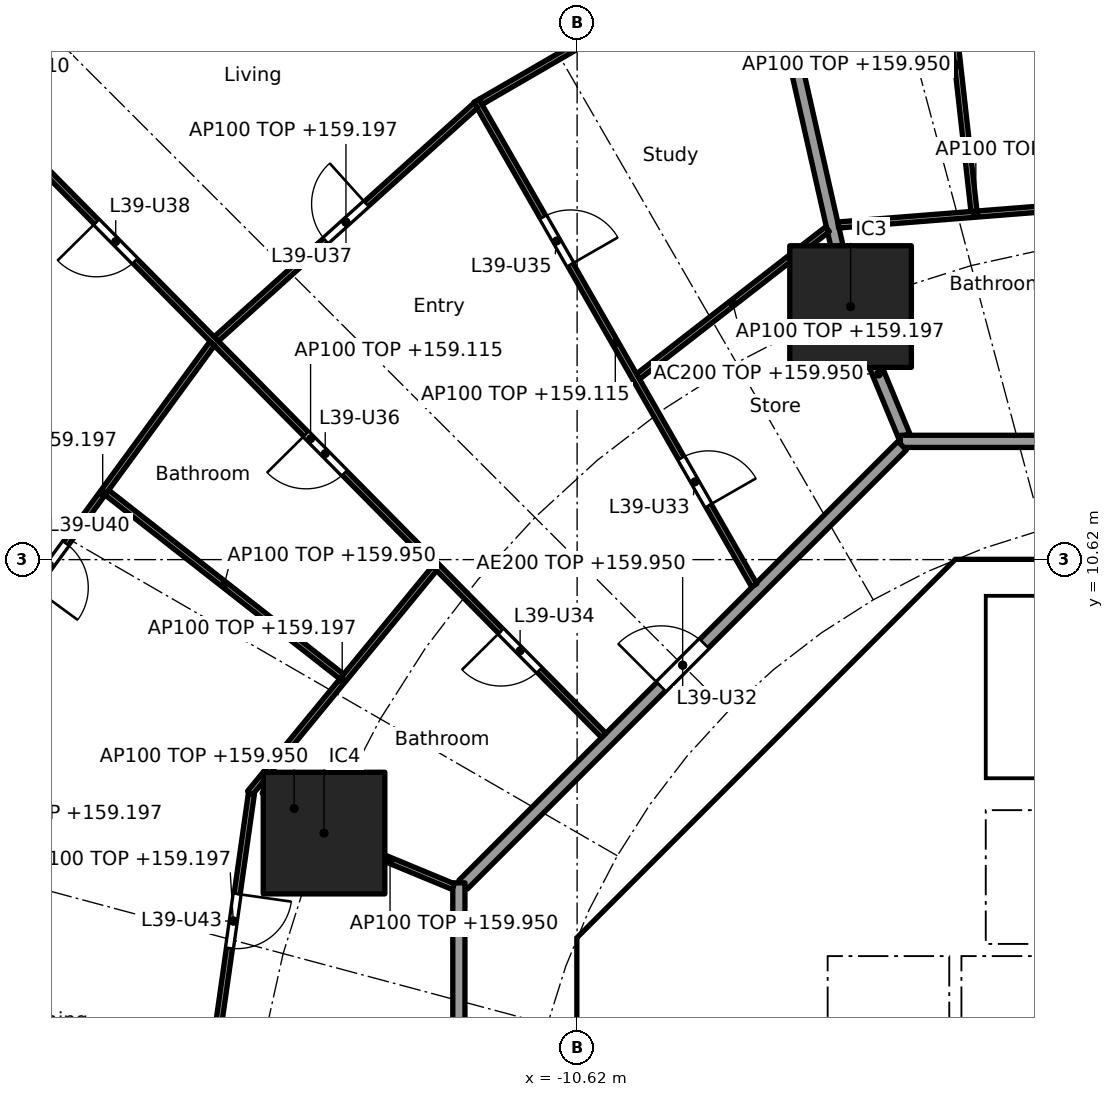
"""IFC4 building model, lengths in metres.
Left out: names, types, materials, properties, quantities, classifications, styles, units other than length and angle.
Written with IfcOpenShell. Run it as: python <this file> out.ifc"""

import sys

from ifc_helpers import new_model, si_unit, direction, frame, frame_2d, origin, origin_2d, place, context, subcontext, project, spatial, polyline, rectangle, outline, extrude, element, fill, save


model = new_model("IFC4")
c1 = context("Model", 3, precision=1e-05, world=origin(), true_north=direction((0.0, 1.0)))
c2 = subcontext(c1, "Body", "Model", "MODEL_VIEW")
j1 = project(units=[si_unit("LENGTHUNIT", "METRE"), si_unit("PLANEANGLEUNIT", "RADIAN")], contexts=[c1])
p1 = place(None, origin())
s1 = spatial("IfcSite", under=j1, at=p1, CompositionType="ELEMENT")
p2 = place(p1, origin())
s2 = spatial("IfcBuilding", under=s1, at=p2, CompositionType="ELEMENT")
p3 = place(p2, frame((0.0, 0.0, 156.6)))
s3 = spatial("IfcBuildingStorey", under=s2, at=p3, CompositionType="ELEMENT", Elevation=156.6)
for number, where, z_axis, x_axis in (
    (1, (-6.123, 14.782, 0.0), (0.0, 0.0, 1.0), (1.0, 0.0, 0.0)),
    (2, (-14.782, 6.123, 0.0), (0.0, 0.0, 1.0), (1.0, 0.0, 0.0)),
):
    element("IfcColumn", number, at=place(p3, frame(where, z_axis=z_axis, x_axis=x_axis)), inside=s3, PredefinedType="COLUMN", context=c2, shape_type="SweptSolid", body=[
        extrude(rectangle(XDim=2.0, YDim=2.0, at=origin_2d()), origin(), (0.0, 0.0, 1.0), 3.7),
    ])
p4 = place(p3, frame((-4.613, 9.988, 0.0), z_axis=(0.0, 0.0, 1.0), x_axis=(-0.707106781187, -0.707106781187, 0.0)))
e3 = element("IfcWall", 3, at=p4, inside=s3, PredefinedType="SHEAR", context=c2, shape_type="SweptSolid", body=[
    extrude(rectangle(XDim=7.602, YDim=0.6, at=frame_2d((3.801, 0.0))), origin(), (0.0, 0.0, 1.0), 3.35),
])
p5 = place(p4, frame((0.351, 0.0, 0.0)))
e4 = element("IfcOpeningElement", 4, at=p5, cuts=e3, PredefinedType="OPENING", context=c2, shape_type="SweptSolid", body=[
    extrude(rectangle(XDim=1.1, YDim=2.1, at=frame_2d((0.55, 1.05))), frame((0.0, 0.31, 0.0), z_axis=(0.0, -1.0, 0.0), x_axis=(1.0, 0.0, 0.0)), (0.0, 0.0, 1.0), 0.62),
])
p6 = place(p3, frame((-10.325, 3.801, 0.0), z_axis=(0.0, 0.0, 1.0), x_axis=(0.0, -1.0, 0.0)))
e5 = element("IfcWall", 5, at=p6, inside=s3, PredefinedType="SHEAR", context=c2, shape_type="SweptSolid", body=[
    extrude(rectangle(XDim=7.602, YDim=0.6, at=frame_2d((3.801, 0.0))), origin(), (0.0, 0.0, 1.0), 3.35),
])
p7 = place(p6, frame((0.651, 0.0, 0.0)))
e6 = element("IfcOpeningElement", 6, at=p7, cuts=e5, PredefinedType="OPENING", context=c2, shape_type="SweptSolid", body=[
    extrude(rectangle(XDim=1.5, YDim=2.1, at=frame_2d((0.75, 1.05))), frame((0.0, 0.31, 0.0), z_axis=(0.0, -1.0, 0.0), x_axis=(1.0, 0.0, 0.0)), (0.0, 0.0, 1.0), 0.62),
])
p8 = place(p6, frame((5.451, 0.0, 0.0)))
e7 = element("IfcOpeningElement", 7, at=p8, cuts=e5, PredefinedType="OPENING", context=c2, shape_type="SweptSolid", body=[
    extrude(rectangle(XDim=1.5, YDim=2.1, at=frame_2d((0.75, 1.05))), frame((0.0, 0.31, 0.0), z_axis=(0.0, -1.0, 0.0), x_axis=(1.0, 0.0, 0.0)), (0.0, 0.0, 1.0), 0.62),
])
p9 = place(p3, frame((-5.8, 4.3, 0.0), z_axis=(0.0, 0.0, 1.0), x_axis=(0.0, 1.0, 0.0)))
e8 = element("IfcWall", 8, at=p9, inside=s3, PredefinedType="PARTITIONING", context=c2, shape_type="SweptSolid", body=[
    extrude(rectangle(XDim=3.927, YDim=0.15, at=frame_2d((1.963, 0.0))), origin(), (0.0, 0.0, 1.0), 3.35),
])
p10 = place(p9, frame((1.551, 0.0, 0.0)))
e9 = element("IfcOpeningElement", 9, at=p10, cuts=e8, PredefinedType="OPENING", context=c2, shape_type="SweptSolid", body=[
    extrude(rectangle(XDim=0.9, YDim=2.1, at=frame_2d((0.45, 1.05))), frame((0.0, 0.085, 0.0), z_axis=(0.0, -1.0, 0.0), x_axis=(1.0, 0.0, 0.0)), (0.0, 0.0, 1.0), 0.17),
])
p11 = place(p3, frame((-4.0, 4.3, 0.0), z_axis=(0.0, 0.0, 1.0), x_axis=(0.0, 1.0, 0.0)))
e10 = element("IfcWall", 10, at=p11, inside=s3, PredefinedType="SOLIDWALL", context=c2, shape_type="SweptSolid", body=[
    extrude(rectangle(XDim=2.2, YDim=0.2, at=frame_2d((1.1, 0.0))), origin(), (0.0, 0.0, 1.0), 3.35),
])
p12 = place(p11, frame((0.55, 0.0, 0.0)))
e11 = element("IfcOpeningElement", 11, at=p12, cuts=e10, PredefinedType="OPENING", context=c2, shape_type="SweptSolid", body=[
    extrude(rectangle(XDim=1.1, YDim=2.1, at=frame_2d((0.55, 1.05))), frame((0.0, 0.11, 0.0), z_axis=(0.0, -1.0, 0.0), x_axis=(1.0, 0.0, 0.0)), (0.0, 0.0, 1.0), 0.22),
])
p13 = place(p3, origin())
e12 = element("IfcWall", 12, at=p13, inside=s3, PredefinedType="SHEAR", context=c2, shape_type="SweptSolid", body=[
    extrude(outline(polyline([(-10.2, 4.825), (-9.776, 4.401), (-10.025, 4.152), (-10.025, 3.801), (-10.625, 3.801), (-10.625, 4.401), (-10.2, 4.825)])), origin(), (0.0, 0.0, 1.0), 3.35),
])
p14 = place(p3, origin())
e13 = element("IfcWall", 13, at=p14, inside=s3, PredefinedType="SHEAR", context=c2, shape_type="SweptSolid", body=[
    extrude(outline(polyline([(-4.152, 10.025), (-4.401, 9.776), (-4.825, 10.2), (-4.401, 10.625), (4.401, 10.625), (4.825, 10.2), (4.401, 9.776), (4.152, 10.025), (-4.152, 10.025)])), origin(), (0.0, 0.0, 1.0), 3.35),
])
p15 = place(p3, origin())
e14 = element("IfcWall", 14, at=p15, inside=s3, PredefinedType="SOLIDWALL", context=c2, shape_type="SweptSolid", body=[
    extrude(outline(polyline([(-6.5, 2.1), (-6.7, 2.1), (-6.7, 4.3), (6.7, 4.3), (6.7, 2.1), (6.5, 2.1), (6.5, 4.1), (4.5, 4.1), (4.5, 2.1), (4.3, 2.1), (4.3, 4.1), (2.3, 4.1), (2.3, 2.1), (2.1, 2.1), (2.1, 4.1), (0.1, 4.1), (0.1, 2.1), (-0.1, 2.1), (-0.1, 4.1), (-2.1, 4.1), (-2.1, 2.1), (-2.3, 2.1), (-2.3, 4.1), (-4.3, 4.1), (-4.3, 2.1), (-4.5, 2.1), (-4.5, 4.1), (-6.5, 4.1), (-6.5, 2.1)])), origin(), (0.0, 0.0, 1.0), 3.35),
])
p16 = place(p3, frame((-10.025, 4.0, 0.0), z_axis=(0.0, 0.0, 1.0), x_axis=(1.0, 0.0, 0.0)))
e15 = element("IfcWall", 15, at=p16, inside=s3, PredefinedType="PARTITIONING", context=c2, shape_type="SweptSolid", body=[
    extrude(rectangle(XDim=3.325, YDim=0.2, at=frame_2d((1.662, 0.0))), origin(), (0.0, 0.0, 1.0), 3.35),
])
p17 = place(p3, origin())
e16 = element("IfcWall", 16, at=p17, inside=s3, PredefinedType="SOLIDWALL", context=c2, shape_type="SweptSolid", body=[
    extrude(outline(polyline([(-3.9, 7.025), (-4.1, 7.025), (-4.1, 10.025), (-3.9, 10.025), (-3.9, 7.025)])), origin(), (0.0, 0.0, 1.0), 3.35),
])
p18 = place(p3, origin())
e17 = element("IfcWall", 17, at=p18, inside=s3, PredefinedType="SOLIDWALL", context=c2, shape_type="SweptSolid", body=[
    extrude(outline(polyline([(4.1, 6.5), (-4.1, 6.5), (-4.1, 7.025), (4.1, 7.025), (4.1, 6.5)])), origin(), (0.0, 0.0, 1.0), 3.35),
])
p19 = place(p3, frame((-5.243, 12.657, 0.0), z_axis=(0.0, 0.0, 1.0), x_axis=(-0.38273085373, 0.923859888513, 0.0)))
e18 = element("IfcWall", 18, at=p19, inside=s3, PredefinedType="PARTITIONING", context=c2, shape_type="SweptSolid", body=[
    extrude(rectangle(XDim=2.199, YDim=0.2, at=frame_2d((1.1, 0.0))), origin(), (0.0, 0.0, 1.0), 3.35),
])
p20 = place(p3, frame((-6.134, 14.831, 0.0), z_axis=(0.0, 0.0, 1.0), x_axis=(-0.220337590808, 0.975423675167, 0.0)))
e19 = element("IfcWall", 19, at=p20, inside=s3, PredefinedType="PARTITIONING", context=c2, shape_type="SweptSolid", body=[
    extrude(rectangle(XDim=10.451, YDim=0.2, at=frame_2d((5.226, 0.0))), origin(), (0.0, 0.0, 1.0), 2.597),
])
p21 = place(p3, frame((5.104, 12.565, 0.0), z_axis=(0.0, 0.0, 1.0), x_axis=(-1.0, 0.0, 0.0)))
e20 = element("IfcWall", 20, at=p21, inside=s3, PredefinedType="PARTITIONING", context=c2, shape_type="SweptSolid", body=[
    extrude(rectangle(XDim=10.409, YDim=0.2, at=frame_2d((5.205, 0.0))), origin(), (0.0, 0.0, 1.0), 3.35),
])
p22 = place(p21, frame((4.604, 0.0, 0.0)))
e21 = element("IfcOpeningElement", 21, at=p22, cuts=e20, PredefinedType="OPENING", context=c2, shape_type="SweptSolid", body=[
    extrude(rectangle(XDim=1.0, YDim=2.1, at=frame_2d((0.5, 1.05))), frame((0.0, 0.11, 0.0), z_axis=(0.0, -1.0, 0.0), x_axis=(1.0, 0.0, 0.0)), (0.0, 0.0, 1.0), 0.22),
])
p23 = place(p3, frame((-5.275, 12.494, 0.0), z_axis=(0.0, 0.0, 1.0), x_axis=(-0.707106781187, -0.707106781187, 0.0)))
e22 = element("IfcWall", 22, at=p23, inside=s3, PredefinedType="PARTITIONING", context=c2, shape_type="SweptSolid", body=[
    extrude(rectangle(XDim=10.209, YDim=0.2, at=frame_2d((5.104, 0.0))), origin(), (0.0, 0.0, 1.0), 3.35),
])
p24 = place(p23, frame((4.604, 0.0, 0.0)))
e23 = element("IfcOpeningElement", 23, at=p24, cuts=e22, PredefinedType="OPENING", context=c2, shape_type="SweptSolid", body=[
    extrude(rectangle(XDim=1.0, YDim=2.1, at=frame_2d((0.5, 1.05))), frame((0.0, 0.11, 0.0), z_axis=(0.0, -1.0, 0.0), x_axis=(1.0, 0.0, 0.0)), (0.0, 0.0, 1.0), 0.22),
])
p25 = place(p3, frame((-12.565, 5.304, 0.0), z_axis=(0.0, 0.0, 1.0), x_axis=(0.0, -1.0, 0.0)))
e24 = element("IfcWall", 24, at=p25, inside=s3, PredefinedType="PARTITIONING", context=c2, shape_type="SweptSolid", body=[
    extrude(rectangle(XDim=10.409, YDim=0.2, at=frame_2d((5.205, 0.0))), origin(), (0.0, 0.0, 1.0), 3.35),
])
p26 = place(p3, frame((-1.802, 16.479, 0.0), z_axis=(0.0, 0.0, 1.0), x_axis=(-0.996907698294, -0.078581429625, 0.0)))
e25 = element("IfcWall", 25, at=p26, inside=s3, PredefinedType="PARTITIONING", context=c2, shape_type="SweptSolid", body=[
    extrude(rectangle(XDim=4.536, YDim=0.1, at=frame_2d((2.268, 0.0))), origin(), (0.0, 0.0, 1.0), 2.597),
])
p27 = place(p3, frame((-4.094, 16.349, 0.0), z_axis=(0.0, 0.0, 1.0), x_axis=(-0.110961740678, 0.993824678757, 0.0)))
e26 = element("IfcWall", 26, at=p27, inside=s3, PredefinedType="PARTITIONING", context=c2, shape_type="SweptSolid", body=[
    extrude(rectangle(XDim=4.852, YDim=0.1, at=frame_2d((2.426, 0.0))), origin(), (0.0, 0.0, 1.0), 3.35),
])
p28 = place(p3, frame((-6.503, 16.054, 0.0), z_axis=(0.0, 0.0, 1.0), x_axis=(-0.789428807693, -0.613842127574, 0.0)))
e27 = element("IfcWall", 27, at=p28, inside=s3, PredefinedType="PARTITIONING", context=c2, shape_type="SweptSolid", body=[
    extrude(rectangle(XDim=3.948, YDim=0.1, at=frame_2d((1.974, 0.0))), origin(), (0.0, 0.0, 1.0), 2.597),
])
p29 = place(p3, frame((-7.586, 20.827, 0.0), z_axis=(0.0, 0.0, 1.0), x_axis=(-0.865093450578, -0.501610727325, 0.0)))
e28 = element("IfcWall", 28, at=p29, inside=s3, PredefinedType="PARTITIONING", context=c2, shape_type="SweptSolid", body=[
    extrude(rectangle(XDim=5.343, YDim=0.1, at=frame_2d((2.671, 0.0))), origin(), (0.0, 0.0, 1.0), 2.597),
])
p30 = place(p3, frame((-7.708, 10.198, 0.0), z_axis=(0.0, 0.0, 1.0), x_axis=(-0.497449462689, 0.867492957937, 0.0)))
e29 = element("IfcWall", 29, at=p30, inside=s3, PredefinedType="PARTITIONING", context=c2, shape_type="SweptSolid", body=[
    extrude(rectangle(XDim=9.185, YDim=0.1, at=frame_2d((4.592, 0.0))), origin(), (0.0, 0.0, 1.0), 2.515),
])
p31 = place(p30, frame((1.511, 0.0, 0.0)))
e30 = element("IfcOpeningElement", 30, at=p31, cuts=e29, PredefinedType="OPENING", context=c2, shape_type="SweptSolid", body=[
    extrude(rectangle(XDim=0.9, YDim=2.1, at=frame_2d((0.45, 1.05))), frame((0.0, 0.06, 0.0), z_axis=(0.0, -1.0, 0.0), x_axis=(1.0, 0.0, 0.0)), (0.0, 0.0, 1.0), 0.12),
])
p32 = place(p30, frame((6.078, 0.0, 0.0)))
e31 = element("IfcOpeningElement", 31, at=p32, cuts=e29, PredefinedType="OPENING", context=c2, shape_type="SweptSolid", body=[
    extrude(rectangle(XDim=0.9, YDim=2.1, at=frame_2d((0.45, 1.05))), frame((0.0, 0.06, 0.0), z_axis=(0.0, -1.0, 0.0), x_axis=(1.0, 0.0, 0.0)), (0.0, 0.0, 1.0), 0.12),
])
p33 = place(p3, frame((-12.289, 18.089, 0.0), z_axis=(0.0, 0.0, 1.0), x_axis=(-0.743146066164, -0.669129228435, 0.0)))
e32 = element("IfcWall", 32, at=p33, inside=s3, PredefinedType="PARTITIONING", context=c2, shape_type="SweptSolid", body=[
    extrude(rectangle(XDim=5.739, YDim=0.1, at=frame_2d((2.87, 0.0))), origin(), (0.0, 0.0, 1.0), 2.597),
])
p34 = place(p33, frame((2.42, 0.0, 0.0)))
e33 = element("IfcOpeningElement", 33, at=p34, cuts=e32, PredefinedType="OPENING", context=c2, shape_type="SweptSolid", body=[
    extrude(rectangle(XDim=0.9, YDim=2.1, at=frame_2d((0.45, 1.05))), frame((0.0, 0.06, 0.0), z_axis=(0.0, -1.0, 0.0), x_axis=(1.0, 0.0, 0.0)), (0.0, 0.0, 1.0), 0.12),
])
p35 = place(p3, frame((-10.182, 7.729, 0.0), z_axis=(0.0, 0.0, 1.0), x_axis=(-0.702930219229, 0.7112588185, 0.0)))
e34 = element("IfcWall", 34, at=p35, inside=s3, PredefinedType="PARTITIONING", context=c2, shape_type="SweptSolid", body=[
    extrude(rectangle(XDim=13.719, YDim=0.1, at=frame_2d((6.859, 0.0))), origin(), (0.0, 0.0, 1.0), 2.515),
])
p36 = place(p35, frame((1.507, 0.0, 0.0)))
e35 = element("IfcOpeningElement", 35, at=p36, cuts=e34, PredefinedType="OPENING", context=c2, shape_type="SweptSolid", body=[
    extrude(rectangle(XDim=0.9, YDim=2.1, at=frame_2d((0.45, 1.05))), frame((0.0, 0.06, 0.0), z_axis=(0.0, -1.0, 0.0), x_axis=(1.0, 0.0, 0.0)), (0.0, 0.0, 1.0), 0.12),
])
p37 = place(p35, frame((6.067, 0.0, 0.0)))
e36 = element("IfcOpeningElement", 36, at=p37, cuts=e34, PredefinedType="OPENING", context=c2, shape_type="SweptSolid", body=[
    extrude(rectangle(XDim=0.9, YDim=2.1, at=frame_2d((0.45, 1.05))), frame((0.0, 0.06, 0.0), z_axis=(0.0, -1.0, 0.0), x_axis=(1.0, 0.0, 0.0)), (0.0, 0.0, 1.0), 0.12),
])
p38 = place(p35, frame((10.969, 0.0, 0.0)))
e37 = element("IfcOpeningElement", 37, at=p38, cuts=e34, PredefinedType="OPENING", context=c2, shape_type="SweptSolid", body=[
    extrude(rectangle(XDim=0.9, YDim=2.1, at=frame_2d((0.45, 1.05))), frame((0.0, 0.06, 0.0), z_axis=(0.0, -1.0, 0.0), x_axis=(1.0, 0.0, 0.0)), (0.0, 0.0, 1.0), 0.12),
])
p39 = place(p3, frame((-12.965, 10.475, 0.0), z_axis=(0.0, 0.0, 1.0), x_axis=(-0.634932102074, -0.772567942485, 0.0)))
e38 = element("IfcWall", 38, at=p39, inside=s3, PredefinedType="PARTITIONING", context=c2, shape_type="SweptSolid", body=[
    extrude(rectangle(XDim=4.782, YDim=0.1, at=frame_2d((2.391, 0.0))), origin(), (0.0, 0.0, 1.0), 2.597),
])
p40 = place(p3, frame((-16.621, 14.174, 0.0), z_axis=(0.0, 0.0, 1.0), x_axis=(-0.590672767272, -0.806911198338, 0.0)))
e39 = element("IfcWall", 39, at=p40, inside=s3, PredefinedType="PARTITIONING", context=c2, shape_type="SweptSolid", body=[
    extrude(rectangle(XDim=6.099, YDim=0.1, at=frame_2d((3.05, 0.0))), origin(), (0.0, 0.0, 1.0), 2.597),
])
p41 = place(p40, frame((4.074, 0.0, 0.0)))
e40 = element("IfcOpeningElement", 40, at=p41, cuts=e39, PredefinedType="OPENING", context=c2, shape_type="SweptSolid", body=[
    extrude(rectangle(XDim=0.9, YDim=2.1, at=frame_2d((0.45, 1.05))), frame((0.0, 0.06, 0.0), z_axis=(0.0, -1.0, 0.0), x_axis=(1.0, 0.0, 0.0)), (0.0, 0.0, 1.0), 0.12),
])
p42 = place(p3, frame((-14.491, 8.697, 0.0), z_axis=(0.0, 0.0, 1.0), x_axis=(-0.787139479951, 0.616775031193, 0.0)))
e41 = element("IfcWall", 41, at=p42, inside=s3, PredefinedType="PARTITIONING", context=c2, shape_type="SweptSolid", body=[
    extrude(rectangle(XDim=4.907, YDim=0.1, at=frame_2d((2.453, 0.0))), origin(), (0.0, 0.0, 1.0), 3.35),
])
p43 = place(p3, frame((-12.657, 5.243, 0.0), z_axis=(0.0, 0.0, 1.0), x_axis=(-0.923864733477, 0.382719158442, 0.0)))
e42 = element("IfcWall", 42, at=p43, inside=s3, PredefinedType="PARTITIONING", context=c2, shape_type="SweptSolid", body=[
    extrude(rectangle(XDim=2.25, YDim=0.1, at=frame_2d((1.125, 0.0))), origin(), (0.0, 0.0, 1.0), 3.35),
])
p44 = place(p3, frame((-15.977, 6.769, 0.0), z_axis=(0.0, 0.0, 1.0), x_axis=(-0.140693592547, -0.990053186963, 0.0)))
e43 = element("IfcWall", 43, at=p44, inside=s3, PredefinedType="PARTITIONING", context=c2, shape_type="SweptSolid", body=[
    extrude(rectangle(XDim=4.227, YDim=0.1, at=frame_2d((2.114, 0.0))), origin(), (0.0, 0.0, 1.0), 2.597),
])
p45 = place(p44, frame((1.664, 0.0, 0.0)))
e44 = element("IfcOpeningElement", 44, at=p45, cuts=e43, PredefinedType="OPENING", context=c2, shape_type="SweptSolid", body=[
    extrude(rectangle(XDim=0.9, YDim=2.1, at=frame_2d((0.45, 1.05))), frame((0.0, 0.06, 0.0), z_axis=(0.0, -1.0, 0.0), x_axis=(1.0, 0.0, 0.0)), (0.0, 0.0, 1.0), 0.12),
])
p46 = place(p3, frame((-14.772, 6.233, 0.0), z_axis=(0.0, 0.0, 1.0), x_axis=(-0.862824428323, 0.50550371501, 0.0)))
e45 = element("IfcWall", 45, at=p46, inside=s3, PredefinedType="PARTITIONING", context=c2, shape_type="SweptSolid", body=[
    extrude(rectangle(XDim=1.162, YDim=0.1, at=frame_2d((0.581, 0.0))), origin(), (0.0, 0.0, 1.0), 3.35),
])
p47 = place(p12, origin())
e46 = element("IfcDoor", 46, at=p47, inside=s3, OperationType="DOUBLE_DOOR_SLIDING", PredefinedType="DOOR", context=c2, shape_type="SweptSolid", body=[
    extrude(rectangle(XDim=1.1, YDim=2.1, at=frame_2d((0.55, 1.05))), frame((0.0, 0.025, 0.0), z_axis=(0.0, -1.0, 0.0), x_axis=(1.0, 0.0, 0.0)), (0.0, 0.0, 1.0), 0.05),
])
fill(e11, e46)
p48 = place(p10, origin())
e47 = element("IfcDoor", 47, at=p48, inside=s3, OperationType="SINGLE_SWING_LEFT", PredefinedType="DOOR", context=c2, shape_type="SweptSolid", body=[
    extrude(rectangle(XDim=0.9, YDim=2.1, at=frame_2d((0.45, 1.05))), frame((0.0, 0.025, 0.0), z_axis=(0.0, -1.0, 0.0), x_axis=(1.0, 0.0, 0.0)), (0.0, 0.0, 1.0), 0.05),
])
fill(e9, e47)
p49 = place(p7, origin())
e48 = element("IfcDoor", 48, at=p49, inside=s3, OperationType="DOUBLE_DOOR_SINGLE_SWING", PredefinedType="DOOR", context=c2, shape_type="SweptSolid", body=[
    extrude(rectangle(XDim=1.5, YDim=2.1, at=frame_2d((0.75, 1.05))), frame((0.0, 0.025, 0.0), z_axis=(0.0, -1.0, 0.0), x_axis=(1.0, 0.0, 0.0)), (0.0, 0.0, 1.0), 0.05),
])
fill(e6, e48)
p50 = place(p5, origin())
e49 = element("IfcDoor", 49, at=p50, inside=s3, OperationType="SINGLE_SWING_LEFT", PredefinedType="DOOR", context=c2, shape_type="SweptSolid", body=[
    extrude(rectangle(XDim=1.1, YDim=2.1, at=frame_2d((0.55, 1.05))), frame((0.0, 0.025, 0.0), z_axis=(0.0, -1.0, 0.0), x_axis=(1.0, 0.0, 0.0)), (0.0, 0.0, 1.0), 0.05),
])
fill(e4, e49)
p51 = place(p24, frame((1.0, 0.0, 0.0), x_axis=(-1.0, 0.0, 0.0)))
e50 = element("IfcDoor", 50, at=p51, inside=s3, OperationType="SINGLE_SWING_LEFT", PredefinedType="DOOR", context=c2, shape_type="SweptSolid", body=[
    extrude(rectangle(XDim=1.0, YDim=2.1, at=frame_2d((0.5, 1.05))), frame((0.0, 0.025, 0.0), z_axis=(0.0, -1.0, 0.0), x_axis=(1.0, 0.0, 0.0)), (0.0, 0.0, 1.0), 0.05),
])
fill(e23, e50)
p52 = place(p31, frame((0.9, 0.0, 0.0), x_axis=(-1.0, 0.0, 0.0)))
e51 = element("IfcDoor", 51, at=p52, inside=s3, OperationType="SINGLE_SWING_RIGHT", PredefinedType="DOOR", context=c2, shape_type="SweptSolid", body=[
    extrude(rectangle(XDim=0.9, YDim=2.1, at=frame_2d((0.45, 1.05))), frame((0.0, 0.025, 0.0), z_axis=(0.0, -1.0, 0.0), x_axis=(1.0, 0.0, 0.0)), (0.0, 0.0, 1.0), 0.05),
])
fill(e30, e51)
p53 = place(p36, origin())
e52 = element("IfcDoor", 52, at=p53, inside=s3, OperationType="SINGLE_SWING_RIGHT", PredefinedType="DOOR", context=c2, shape_type="SweptSolid", body=[
    extrude(rectangle(XDim=0.9, YDim=2.1, at=frame_2d((0.45, 1.05))), frame((0.0, 0.025, 0.0), z_axis=(0.0, -1.0, 0.0), x_axis=(1.0, 0.0, 0.0)), (0.0, 0.0, 1.0), 0.05),
])
fill(e35, e52)
p54 = place(p32, frame((0.9, 0.0, 0.0), x_axis=(-1.0, 0.0, 0.0)))
e53 = element("IfcDoor", 53, at=p54, inside=s3, OperationType="SINGLE_SWING_RIGHT", PredefinedType="DOOR", context=c2, shape_type="SweptSolid", body=[
    extrude(rectangle(XDim=0.9, YDim=2.1, at=frame_2d((0.45, 1.05))), frame((0.0, 0.025, 0.0), z_axis=(0.0, -1.0, 0.0), x_axis=(1.0, 0.0, 0.0)), (0.0, 0.0, 1.0), 0.05),
])
fill(e31, e53)
p55 = place(p37, origin())
e54 = element("IfcDoor", 54, at=p55, inside=s3, OperationType="SINGLE_SWING_RIGHT", PredefinedType="DOOR", context=c2, shape_type="SweptSolid", body=[
    extrude(rectangle(XDim=0.9, YDim=2.1, at=frame_2d((0.45, 1.05))), frame((0.0, 0.025, 0.0), z_axis=(0.0, -1.0, 0.0), x_axis=(1.0, 0.0, 0.0)), (0.0, 0.0, 1.0), 0.05),
])
fill(e36, e54)
p56 = place(p34, frame((0.9, 0.0, 0.0), x_axis=(-1.0, 0.0, 0.0)))
e55 = element("IfcDoor", 55, at=p56, inside=s3, OperationType="SINGLE_SWING_RIGHT", PredefinedType="DOOR", context=c2, shape_type="SweptSolid", body=[
    extrude(rectangle(XDim=0.9, YDim=2.1, at=frame_2d((0.45, 1.05))), frame((0.0, 0.025, 0.0), z_axis=(0.0, -1.0, 0.0), x_axis=(1.0, 0.0, 0.0)), (0.0, 0.0, 1.0), 0.05),
])
fill(e33, e55)
p57 = place(p38, origin())
e56 = element("IfcDoor", 56, at=p57, inside=s3, OperationType="SINGLE_SWING_RIGHT", PredefinedType="DOOR", context=c2, shape_type="SweptSolid", body=[
    extrude(rectangle(XDim=0.9, YDim=2.1, at=frame_2d((0.45, 1.05))), frame((0.0, 0.025, 0.0), z_axis=(0.0, -1.0, 0.0), x_axis=(1.0, 0.0, 0.0)), (0.0, 0.0, 1.0), 0.05),
])
fill(e37, e56)
p58 = place(p41, origin())
e57 = element("IfcDoor", 57, at=p58, inside=s3, OperationType="SINGLE_SWING_RIGHT", PredefinedType="DOOR", context=c2, shape_type="SweptSolid", body=[
    extrude(rectangle(XDim=0.9, YDim=2.1, at=frame_2d((0.45, 1.05))), frame((0.0, 0.025, 0.0), z_axis=(0.0, -1.0, 0.0), x_axis=(1.0, 0.0, 0.0)), (0.0, 0.0, 1.0), 0.05),
])
fill(e40, e57)
p59 = place(p45, origin())
e58 = element("IfcDoor", 58, at=p59, inside=s3, OperationType="SINGLE_SWING_LEFT", PredefinedType="DOOR", context=c2, shape_type="SweptSolid", body=[
    extrude(rectangle(XDim=0.9, YDim=2.1, at=frame_2d((0.45, 1.05))), frame((0.0, 0.025, 0.0), z_axis=(0.0, -1.0, 0.0), x_axis=(1.0, 0.0, 0.0)), (0.0, 0.0, 1.0), 0.05),
])
fill(e44, e58)
save(model, sys.argv[1])
